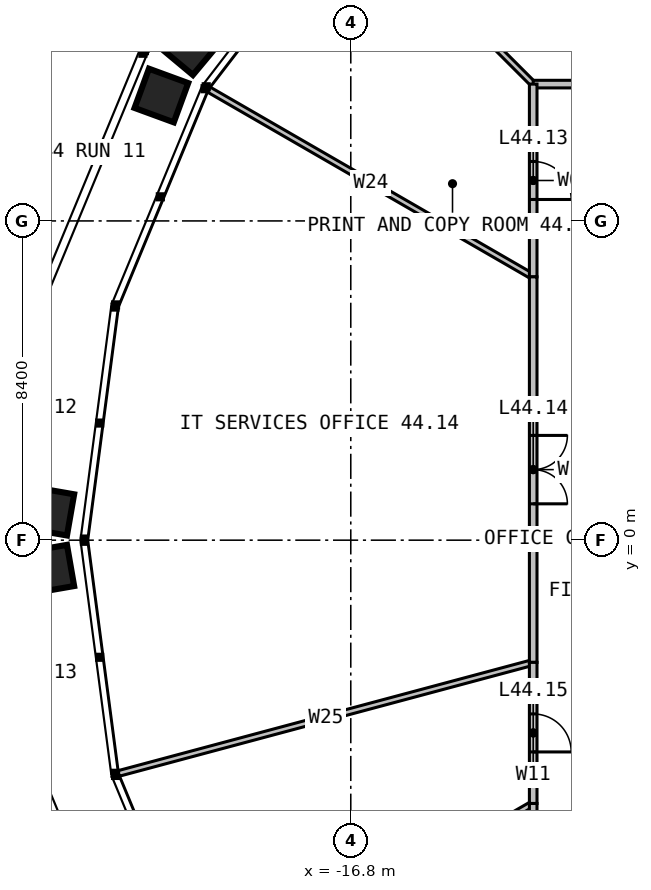
"""IFC4 building model, lengths in metres.
Left out: names, types, materials, properties, quantities, classifications, styles, units other than length and angle.
Written with IfcOpenShell. Run it as: python <this file> out.ifc"""

import sys

from ifc_helpers import new_model, si_unit, direction, frame, frame_2d, origin, place, context, subcontext, project, spatial, rectangle, extrude, element, fill, save


model = new_model("IFC4")
c1 = context("Model", 3, precision=1e-05, world=origin(), true_north=direction((0.0, 1.0)))
c2 = subcontext(c1, "Body", "Model", "MODEL_VIEW")
j1 = project(units=[si_unit("LENGTHUNIT", "METRE"), si_unit("PLANEANGLEUNIT", "RADIAN")], contexts=[c1])
p1 = place(None, origin())
s1 = spatial("IfcSite", under=j1, at=p1, CompositionType="ELEMENT")
p2 = place(p1, origin())
s2 = spatial("IfcBuilding", under=s1, at=p2, CompositionType="ELEMENT")
p3 = place(p2, frame((0.0, 0.0, 183.0)))
s3 = spatial("IfcBuildingStorey", under=s2, at=p3, CompositionType="ELEMENT", Elevation=183.0)
p4 = place(p3, frame((-6.928, 12.0, 0.0), z_axis=(0.0, 0.0, 1.0), x_axis=(-0.49999595416, 0.866027739639, 0.0)))
e1 = element("IfcWall", 1, at=p4, inside=s3, PredefinedType="PARTITIONING", context=c2, shape_type="SweptSolid", body=[
    extrude(rectangle(XDim=9.865, YDim=0.15, at=frame_2d((4.932, 0.0))), origin(), (0.0, 0.0, 1.0), 2.79),
])
p5 = place(p3, frame((-12.0, 12.0, 0.0), z_axis=(0.0, 0.0, 1.0), x_axis=(-0.707106781187, 0.707106781187, 0.0)))
e2 = element("IfcWall", 2, at=p5, inside=s3, PredefinedType="PARTITIONING", context=c2, shape_type="SweptSolid", body=[
    extrude(rectangle(XDim=6.751, YDim=0.15, at=frame_2d((3.375, 0.0))), origin(), (0.0, 0.0, 1.0), 2.79),
])
p6 = place(p3, frame((-12.0, 6.928, 0.0), z_axis=(0.0, 0.0, 1.0), x_axis=(-0.866027739639, 0.49999595416, 0.0)))
e3 = element("IfcWall", 3, at=p6, inside=s3, PredefinedType="PARTITIONING", context=c2, shape_type="SweptSolid", body=[
    extrude(rectangle(XDim=9.865, YDim=0.15, at=frame_2d((4.932, 0.0))), origin(), (0.0, 0.0, 1.0), 2.79),
])
p7 = place(p3, frame((-12.0, -3.215, 0.0), z_axis=(0.0, 0.0, 1.0), x_axis=(-0.965926155577, -0.258817816178, 0.0)))
e4 = element("IfcWall", 4, at=p7, inside=s3, PredefinedType="PARTITIONING", context=c2, shape_type="SweptSolid", body=[
    extrude(rectangle(XDim=11.298, YDim=0.15, at=frame_2d((5.649, 0.0))), origin(), (0.0, 0.0, 1.0), 2.79),
])
p8 = place(p3, frame((-12.0, -6.928, 0.0), z_axis=(0.0, 0.0, 1.0), x_axis=(-0.866027739639, -0.49999595416, 0.0)))
e5 = element("IfcWall", 5, at=p8, inside=s3, PredefinedType="PARTITIONING", context=c2, shape_type="SweptSolid", body=[
    extrude(rectangle(XDim=9.865, YDim=0.15, at=frame_2d((4.932, 0.0))), origin(), (0.0, 0.0, 1.0), 2.79),
])
p9 = place(p3, frame((-6.928, 12.0, 0.0), z_axis=(0.0, 0.0, 1.0), x_axis=(-1.0, 0.0, 0.0)))
e6 = element("IfcWall", 6, at=p9, inside=s3, PredefinedType="PARTITIONING", context=c2, shape_type="SweptSolid", body=[
    extrude(rectangle(XDim=5.072, YDim=0.2, at=frame_2d((2.536, 0.0))), origin(), (0.0, 0.0, 1.0), 3.8),
])
p10 = place(p9, frame((2.036, 0.0, 0.0)))
e7 = element("IfcOpeningElement", 7, at=p10, cuts=e6, PredefinedType="OPENING", context=c2, shape_type="SweptSolid", body=[
    extrude(rectangle(XDim=1.0, YDim=2.2, at=frame_2d((0.5, 1.1))), frame((0.0, 0.11, 0.0), z_axis=(0.0, -1.0, 0.0), x_axis=(1.0, 0.0, 0.0)), (0.0, 0.0, 1.0), 0.22),
])
p11 = place(p3, frame((-12.0, 12.0, 0.0), z_axis=(0.0, 0.0, 1.0), x_axis=(0.0, -1.0, 0.0)))
e8 = element("IfcWall", 8, at=p11, inside=s3, PredefinedType="PARTITIONING", context=c2, shape_type="SweptSolid", body=[
    extrude(rectangle(XDim=5.072, YDim=0.2, at=frame_2d((2.536, 0.0))), origin(), (0.0, 0.0, 1.0), 3.8),
])
p12 = place(p11, frame((2.036, 0.0, 0.0)))
e9 = element("IfcOpeningElement", 9, at=p12, cuts=e8, PredefinedType="OPENING", context=c2, shape_type="SweptSolid", body=[
    extrude(rectangle(XDim=1.0, YDim=2.2, at=frame_2d((0.5, 1.1))), frame((0.0, 0.11, 0.0), z_axis=(0.0, -1.0, 0.0), x_axis=(1.0, 0.0, 0.0)), (0.0, 0.0, 1.0), 0.22),
])
p13 = place(p3, frame((-12.0, 6.928, 0.0), z_axis=(0.0, 0.0, 1.0), x_axis=(0.0, -1.0, 0.0)))
e10 = element("IfcWall", 10, at=p13, inside=s3, PredefinedType="PARTITIONING", context=c2, shape_type="SweptSolid", body=[
    extrude(rectangle(XDim=10.144, YDim=0.2, at=frame_2d((5.072, 0.0))), origin(), (0.0, 0.0, 1.0), 3.8),
])
p14 = place(p13, frame((4.172, 0.0, 0.0)))
e11 = element("IfcOpeningElement", 11, at=p14, cuts=e10, PredefinedType="OPENING", context=c2, shape_type="SweptSolid", body=[
    extrude(rectangle(XDim=1.8, YDim=2.2, at=frame_2d((0.9, 1.1))), frame((0.0, 0.11, 0.0), z_axis=(0.0, -1.0, 0.0), x_axis=(1.0, 0.0, 0.0)), (0.0, 0.0, 1.0), 0.22),
])
p15 = place(p3, frame((-12.0, -3.215, 0.0), z_axis=(0.0, 0.0, 1.0), x_axis=(0.0, -1.0, 0.0)))
e12 = element("IfcWall", 12, at=p15, inside=s3, PredefinedType="PARTITIONING", context=c2, shape_type="SweptSolid", body=[
    extrude(rectangle(XDim=3.713, YDim=0.2, at=frame_2d((1.856, 0.0))), origin(), (0.0, 0.0, 1.0), 3.8),
])
p16 = place(p15, frame((1.356, 0.0, 0.0)))
e13 = element("IfcOpeningElement", 13, at=p16, cuts=e12, PredefinedType="OPENING", context=c2, shape_type="SweptSolid", body=[
    extrude(rectangle(XDim=1.0, YDim=2.2, at=frame_2d((0.5, 1.1))), frame((0.0, 0.11, 0.0), z_axis=(0.0, -1.0, 0.0), x_axis=(1.0, 0.0, 0.0)), (0.0, 0.0, 1.0), 0.22),
])
p17 = place(p3, frame((-12.0, -6.928, 0.0), z_axis=(0.0, 0.0, 1.0), x_axis=(0.0, -1.0, 0.0)))
e14 = element("IfcWall", 14, at=p17, inside=s3, PredefinedType="PARTITIONING", context=c2, shape_type="SweptSolid", body=[
    extrude(rectangle(XDim=5.072, YDim=0.2, at=frame_2d((2.536, 0.0))), origin(), (0.0, 0.0, 1.0), 3.8),
])
p18 = place(p17, frame((2.036, 0.0, 0.0)))
e15 = element("IfcOpeningElement", 15, at=p18, cuts=e14, PredefinedType="OPENING", context=c2, shape_type="SweptSolid", body=[
    extrude(rectangle(XDim=1.0, YDim=2.2, at=frame_2d((0.5, 1.1))), frame((0.0, 0.11, 0.0), z_axis=(0.0, -1.0, 0.0), x_axis=(1.0, 0.0, 0.0)), (0.0, 0.0, 1.0), 0.22),
])
p19 = place(p12, origin())
e16 = element("IfcDoor", 16, at=p19, inside=s3, OperationType="SINGLE_SWING_RIGHT", PredefinedType="DOOR", context=c2, shape_type="SweptSolid", body=[
    extrude(rectangle(XDim=1.0, YDim=2.2, at=frame_2d((0.5, 1.1))), frame((0.0, 0.025, 0.0), z_axis=(0.0, -1.0, 0.0), x_axis=(1.0, 0.0, 0.0)), (0.0, 0.0, 1.0), 0.05),
])
fill(e9, e16)
p20 = place(p14, origin())
e17 = element("IfcDoor", 17, at=p20, inside=s3, OperationType="DOUBLE_DOOR_SINGLE_SWING", PredefinedType="DOOR", context=c2, shape_type="SweptSolid", body=[
    extrude(rectangle(XDim=1.8, YDim=2.2, at=frame_2d((0.9, 1.1))), frame((0.0, 0.025, 0.0), z_axis=(0.0, -1.0, 0.0), x_axis=(1.0, 0.0, 0.0)), (0.0, 0.0, 1.0), 0.05),
])
fill(e11, e17)
p21 = place(p16, origin())
e18 = element("IfcDoor", 18, at=p21, inside=s3, OperationType="SINGLE_SWING_RIGHT", PredefinedType="DOOR", context=c2, shape_type="SweptSolid", body=[
    extrude(rectangle(XDim=1.0, YDim=2.2, at=frame_2d((0.5, 1.1))), frame((0.0, 0.025, 0.0), z_axis=(0.0, -1.0, 0.0), x_axis=(1.0, 0.0, 0.0)), (0.0, 0.0, 1.0), 0.05),
])
fill(e13, e18)
save(model, sys.argv[1])
